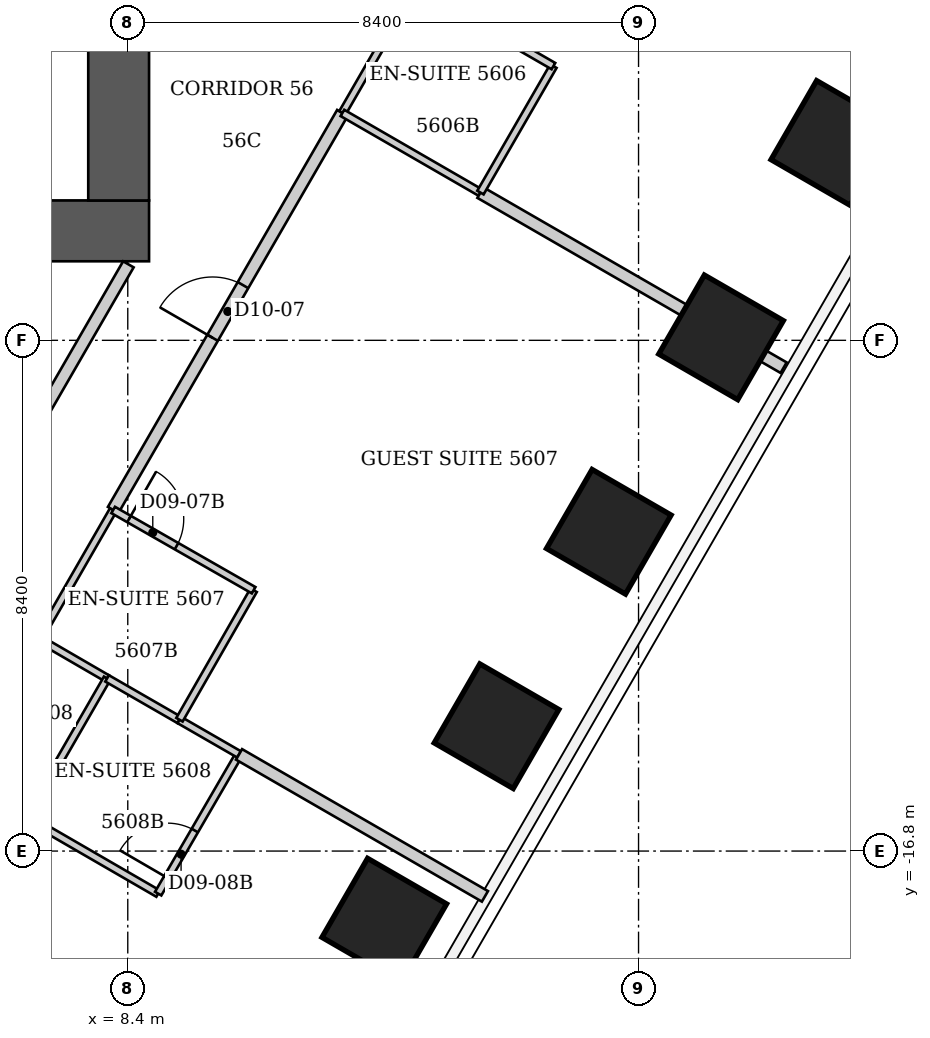
"""IFC4 building model, lengths in metres.
Left out: names, types, materials, properties, quantities, classifications, styles, units other than length and angle.
Written with IfcOpenShell. Run it as: python <this file> out.ifc"""

import sys

from ifc_helpers import new_model, si_unit, direction, frame, frame_2d, origin, origin_2d, place, context, subcontext, project, spatial, rectangle, extrude, element, fill, save


model = new_model("IFC4")
c1 = context("Model", 3, precision=1e-05, world=origin(), true_north=direction((0.0, 1.0)))
c2 = subcontext(c1, "Body", "Model", "MODEL_VIEW")
j1 = project(units=[si_unit("LENGTHUNIT", "METRE"), si_unit("PLANEANGLEUNIT", "RADIAN")], contexts=[c1])
p1 = place(None, origin())
s1 = spatial("IfcSite", under=j1, at=p1, CompositionType="ELEMENT")
p2 = place(p1, origin())
s2 = spatial("IfcBuilding", under=s1, at=p2, CompositionType="ELEMENT")
p3 = place(p2, frame((0.0, 0.0, 225.0)))
s3 = spatial("IfcBuildingStorey", under=s2, at=p3, CompositionType="ELEMENT", Elevation=225.0)
for number, where, z_axis, x_axis in (
    (1, (20.003, -5.153, 0.0), (0.0, 0.0, 1.0), (0.866, -0.5, 0.0)),
    (2, (18.157, -8.351, 0.0), (0.0, 0.0, 1.0), (0.866, -0.5, 0.0)),
    (3, (16.311, -11.549, 0.0), (0.0, 0.0, 1.0), (0.866, -0.5, 0.0)),
    (4, (14.465, -14.747, 0.0), (0.0, 0.0, 1.0), (0.866, -0.5, 0.0)),
    (5, (12.618, -17.945, 0.0), (0.0, 0.0, 1.0), (0.866, -0.5, 0.0)),
):
    element("IfcColumn", number, at=place(p3, frame(where, z_axis=z_axis, x_axis=x_axis)), inside=s3, PredefinedType="COLUMN", context=c2, shape_type="SweptSolid", body=[
        extrude(rectangle(XDim=1.5, YDim=1.5, at=origin_2d()), origin(), (0.0, 0.0, 1.0), 3.8),
    ])
p4 = place(p3, frame((-8.75, -6.6, 0.0), z_axis=(0.0, 0.0, 1.0), x_axis=(1.0, 0.0, 0.0)))
e6 = element("IfcWall", 6, at=p4, inside=s3, PredefinedType="SHEAR", context=c2, shape_type="SweptSolid", body=[
    extrude(rectangle(XDim=17.5, YDim=1.0, at=frame_2d((8.75, 0.0))), origin(), (0.0, 0.0, 1.0), 3.8),
])
p5 = place(p3, frame((8.25, -6.1, 0.0), z_axis=(0.0, 0.0, 1.0), x_axis=(0.0, 1.0, 0.0)))
e7 = element("IfcWall", 7, at=p5, inside=s3, PredefinedType="SHEAR", context=c2, shape_type="SweptSolid", body=[
    extrude(rectangle(XDim=12.2, YDim=1.0, at=frame_2d((6.1, 0.0))), origin(), (0.0, 0.0, 1.0), 3.8),
])
p6 = place(p5, frame((7.6, 0.0, 0.0)))
e8 = element("IfcOpeningElement", 8, at=p6, cuts=e7, PredefinedType="OPENING", context=c2, shape_type="SweptSolid", body=[
    extrude(rectangle(XDim=1.2, YDim=2.2, at=frame_2d((0.6, 1.1))), frame((0.0, 0.5, 0.0), z_axis=(0.0, -1.0, 0.0), x_axis=(1.0, 0.0, 0.0)), (0.0, 0.0, 1.0), 1.0),
])
p7 = place(p3, frame((6.35, -18.33, 0.0), z_axis=(0.0, 0.0, 1.0), x_axis=(0.328164304993, -0.944620658745, 0.0)))
e9 = element("IfcWall", 9, at=p7, inside=s3, PredefinedType="PARTITIONING", context=c2, shape_type="SweptSolid", body=[
    extrude(rectangle(XDim=2.498, YDim=0.12, at=frame_2d((1.249, 0.0))), origin(), (0.0, 0.0, 1.0), 3.64),
])
p8 = place(p3, frame((6.74, -16.25, 0.0), z_axis=(0.0, 0.0, 1.0), x_axis=(0.865508881864, -0.500893576935, 0.0)))
e10 = element("IfcWall", 10, at=p8, inside=s3, PredefinedType="PARTITIONING", context=c2, shape_type="SweptSolid", body=[
    extrude(rectangle(XDim=2.496, YDim=0.12, at=frame_2d((1.248, 0.0))), origin(), (0.0, 0.0, 1.0), 3.64),
])
p9 = place(p3, frame((6.94, -13.31, 0.0), z_axis=(0.0, 0.0, 1.0), x_axis=(0.864952631286, -0.501853510132, 0.0)))
e11 = element("IfcWall", 11, at=p9, inside=s3, PredefinedType="PARTITIONING", context=c2, shape_type="SweptSolid", body=[
    extrude(rectangle(XDim=1.295, YDim=0.12, at=frame_2d((0.647, 0.0))), origin(), (0.0, 0.0, 1.0), 3.64),
])
p10 = place(p3, frame((6.94, -13.31, 0.0), z_axis=(0.0, 0.0, 1.0), x_axis=(0.498748634132, 0.866746675766, 0.0)))
e12 = element("IfcWall", 12, at=p10, inside=s3, PredefinedType="PARTITIONING", context=c2, shape_type="SweptSolid", body=[
    extrude(rectangle(XDim=2.446, YDim=0.12, at=frame_2d((1.223, 0.0))), origin(), (0.0, 0.0, 1.0), 3.64),
])
p11 = place(p3, frame((8.06, -13.96, 0.0), z_axis=(0.0, 0.0, 1.0), x_axis=(-0.499407914056, -0.866366975004, 0.0)))
e13 = element("IfcWall", 13, at=p11, inside=s3, PredefinedType="PARTITIONING", context=c2, shape_type="SweptSolid", body=[
    extrude(rectangle(XDim=2.643, YDim=0.12, at=frame_2d((1.322, 0.0))), origin(), (0.0, 0.0, 1.0), 3.64),
])
p12 = place(p3, frame((8.06, -13.96, 0.0), z_axis=(0.0, 0.0, 1.0), x_axis=(0.866505716338, -0.499167149914, 0.0)))
e14 = element("IfcWall", 14, at=p12, inside=s3, PredefinedType="PARTITIONING", context=c2, shape_type="SweptSolid", body=[
    extrude(rectangle(XDim=1.37, YDim=0.12, at=frame_2d((0.685, 0.0))), origin(), (0.0, 0.0, 1.0), 3.64),
])
p13 = place(p3, frame((8.16, -11.19, 0.0), z_axis=(0.0, 0.0, 1.0), x_axis=(0.500004606796, 0.866022744033, 0.0)))
e15 = element("IfcWall", 15, at=p13, inside=s3, PredefinedType="PARTITIONING", context=c2, shape_type="SweptSolid", body=[
    extrude(rectangle(XDim=7.54, YDim=0.2, at=frame_2d((3.77, 0.0))), origin(), (0.0, 0.0, 1.0), 3.64),
])
p14 = place(p13, frame((3.27, 0.0, 0.0)))
e16 = element("IfcOpeningElement", 16, at=p14, cuts=e15, PredefinedType="OPENING", context=c2, shape_type="SweptSolid", body=[
    extrude(rectangle(XDim=1.0, YDim=2.13, at=frame_2d((0.5, 1.065))), frame((0.0, 0.1, 0.0), z_axis=(0.0, -1.0, 0.0), x_axis=(1.0, 0.0, 0.0)), (0.0, 0.0, 1.0), 0.2),
])
p15 = place(p3, frame((8.41, -7.15, 0.0), z_axis=(0.0, 0.0, 1.0), x_axis=(-0.499828628176, -0.866124322748, 0.0)))
e17 = element("IfcWall", 17, at=p15, inside=s3, PredefinedType="PARTITIONING", context=c2, shape_type="SweptSolid", body=[
    extrude(rectangle(XDim=10.484, YDim=0.2, at=frame_2d((5.242, 0.0))), origin(), (0.0, 0.0, 1.0), 3.64),
])
p16 = place(p15, frame((4.692, 0.0, 0.0)))
e18 = element("IfcOpeningElement", 18, at=p16, cuts=e17, PredefinedType="OPENING", context=c2, shape_type="SweptSolid", body=[
    extrude(rectangle(XDim=1.1, YDim=2.2, at=frame_2d((0.55, 1.1))), frame((0.0, 0.1, 0.0), z_axis=(0.0, -1.0, 0.0), x_axis=(1.0, 0.0, 0.0)), (0.0, 0.0, 1.0), 0.2),
])
p17 = place(p3, frame((8.9, -17.5, 0.0), z_axis=(0.0, 0.0, 1.0), x_axis=(0.502242265546, 0.864726954997, 0.0)))
e19 = element("IfcWall", 19, at=p17, inside=s3, PredefinedType="PARTITIONING", context=c2, shape_type="SweptSolid", body=[
    extrude(rectangle(XDim=2.648, YDim=0.12, at=frame_2d((1.324, 0.0))), origin(), (0.0, 0.0, 1.0), 3.64),
])
p18 = place(p17, frame((0.3, 0.0, 0.0)))
e20 = element("IfcOpeningElement", 20, at=p18, cuts=e19, PredefinedType="OPENING", context=c2, shape_type="SweptSolid", body=[
    extrude(rectangle(XDim=0.9, YDim=2.03, at=frame_2d((0.45, 1.015))), frame((0.0, 0.06, 0.0), z_axis=(0.0, -1.0, 0.0), x_axis=(1.0, 0.0, 0.0)), (0.0, 0.0, 1.0), 0.12),
])
p19 = place(p3, frame((9.248, -14.644, 0.0), z_axis=(0.0, 0.0, 1.0), x_axis=(0.866515213998, -0.499150662536, 0.0)))
e21 = element("IfcWall", 21, at=p19, inside=s3, PredefinedType="PARTITIONING", context=c2, shape_type="SweptSolid", body=[
    extrude(rectangle(XDim=1.134, YDim=0.12, at=frame_2d((0.567, 0.0))), origin(), (0.0, 0.0, 1.0), 3.64),
])
p20 = place(p3, frame((9.25, -14.64, 0.0), z_axis=(0.0, 0.0, 1.0), x_axis=(0.497027744361, 0.86773464915, 0.0)))
e22 = element("IfcWall", 22, at=p20, inside=s3, PredefinedType="PARTITIONING", context=c2, shape_type="SweptSolid", body=[
    extrude(rectangle(XDim=2.455, YDim=0.12, at=frame_2d((1.227, 0.0))), origin(), (0.0, 0.0, 1.0), 3.64),
])
p21 = place(p3, frame((10.23, -15.21, 0.0), z_axis=(0.0, 0.0, 1.0), x_axis=(0.86600796803, -0.500030198396, 0.0)))
e23 = element("IfcWall", 23, at=p21, inside=s3, PredefinedType="PARTITIONING", context=c2, shape_type="SweptSolid", body=[
    extrude(rectangle(XDim=4.67, YDim=0.2, at=frame_2d((2.335, 0.0))), origin(), (0.0, 0.0, 1.0), 3.64),
])
p22 = place(p3, frame((10.47, -12.51, 0.0), z_axis=(0.0, 0.0, 1.0), x_axis=(-0.86821490448, 0.49618835097, 0.0)))
e24 = element("IfcWall", 24, at=p22, inside=s3, PredefinedType="PARTITIONING", context=c2, shape_type="SweptSolid", body=[
    extrude(rectangle(XDim=2.66, YDim=0.12, at=frame_2d((1.33, 0.0))), origin(), (0.0, 0.0, 1.0), 2.878),
])
p23 = place(p22, frame((1.46, 0.0, 0.0)))
e25 = element("IfcOpeningElement", 25, at=p23, cuts=e24, PredefinedType="OPENING", context=c2, shape_type="SweptSolid", body=[
    extrude(rectangle(XDim=0.9, YDim=2.03, at=frame_2d((0.45, 1.015))), frame((0.0, 0.06, 0.0), z_axis=(0.0, -1.0, 0.0), x_axis=(1.0, 0.0, 0.0)), (0.0, 0.0, 1.0), 0.12),
])
p24 = place(p3, frame((11.93, -4.66, 0.0), z_axis=(0.0, 0.0, 1.0), x_axis=(0.499737123639, 0.866177122335, 0.0)))
e26 = element("IfcWall", 26, at=p24, inside=s3, PredefinedType="PARTITIONING", context=c2, shape_type="SweptSolid", body=[
    extrude(rectangle(XDim=2.401, YDim=0.12, at=frame_2d((1.201, 0.0))), origin(), (0.0, 0.0, 1.0), 3.64),
])
p25 = place(p3, frame((11.93, -4.66, 0.0), z_axis=(0.0, 0.0, 1.0), x_axis=(0.865969958829, -0.500096021185, 0.0)))
e27 = element("IfcWall", 27, at=p25, inside=s3, PredefinedType="PARTITIONING", context=c2, shape_type="SweptSolid", body=[
    extrude(rectangle(XDim=2.621, YDim=0.12, at=frame_2d((1.311, 0.0))), origin(), (0.0, 0.0, 1.0), 3.038),
])
p26 = place(p3, frame((14.2, -5.971, 0.0), z_axis=(0.0, 0.0, 1.0), x_axis=(0.86600340545, -0.500038100297, 0.0)))
e28 = element("IfcWall", 28, at=p26, inside=s3, PredefinedType="PARTITIONING", context=c2, shape_type="SweptSolid", body=[
    extrude(rectangle(XDim=5.758, YDim=0.2, at=frame_2d((2.879, 0.0))), origin(), (0.0, 0.0, 1.0), 3.038),
])
p27 = place(p3, frame((14.2, -5.97, 0.0), z_axis=(0.0, 0.0, 1.0), x_axis=(0.499737123639, 0.866177122335, 0.0)))
e29 = element("IfcWall", 29, at=p27, inside=s3, PredefinedType="PARTITIONING", context=c2, shape_type="SweptSolid", body=[
    extrude(rectangle(XDim=2.401, YDim=0.12, at=frame_2d((1.201, 0.0))), origin(), (0.0, 0.0, 1.0), 3.64),
])
p28 = place(p3, frame((15.4, -3.89, 0.0), z_axis=(0.0, 0.0, 1.0), x_axis=(-0.866154567199, 0.49977621564, 0.0)))
e30 = element("IfcWall", 30, at=p28, inside=s3, PredefinedType="PARTITIONING", context=c2, shape_type="SweptSolid", body=[
    extrude(rectangle(XDim=2.621, YDim=0.12, at=frame_2d((1.311, 0.0))), origin(), (0.0, 0.0, 1.0), 3.64),
])
p29 = place(p28, frame((1.421, 0.0, 0.0)))
e31 = element("IfcOpeningElement", 31, at=p29, cuts=e30, PredefinedType="OPENING", context=c2, shape_type="SweptSolid", body=[
    extrude(rectangle(XDim=0.9, YDim=2.03, at=frame_2d((0.45, 1.015))), frame((0.0, 0.06, 0.0), z_axis=(0.0, -1.0, 0.0), x_axis=(1.0, 0.0, 0.0)), (0.0, 0.0, 1.0), 0.12),
])
p30 = place(p14, origin())
e32 = element("IfcDoor", 32, at=p30, inside=s3, OperationType="SINGLE_SWING_LEFT", PredefinedType="DOOR", context=c2, shape_type="SweptSolid", body=[
    extrude(rectangle(XDim=1.0, YDim=2.13, at=frame_2d((0.5, 1.065))), frame((0.0, 0.025, 0.0), z_axis=(0.0, -1.0, 0.0), x_axis=(1.0, 0.0, 0.0)), (0.0, 0.0, 1.0), 0.05),
])
fill(e16, e32)
p31 = place(p23, origin())
e33 = element("IfcDoor", 33, at=p31, inside=s3, OperationType="SINGLE_SWING_RIGHT", PredefinedType="DOOR", context=c2, shape_type="SweptSolid", body=[
    extrude(rectangle(XDim=0.9, YDim=2.03, at=frame_2d((0.45, 1.015))), frame((0.0, 0.025, 0.0), z_axis=(0.0, -1.0, 0.0), x_axis=(1.0, 0.0, 0.0)), (0.0, 0.0, 1.0), 0.05),
])
fill(e25, e33)
p32 = place(p18, origin())
e34 = element("IfcDoor", 34, at=p32, inside=s3, OperationType="SINGLE_SWING_LEFT", PredefinedType="DOOR", context=c2, shape_type="SweptSolid", body=[
    extrude(rectangle(XDim=0.9, YDim=2.03, at=frame_2d((0.45, 1.015))), frame((0.0, 0.025, 0.0), z_axis=(0.0, -1.0, 0.0), x_axis=(1.0, 0.0, 0.0)), (0.0, 0.0, 1.0), 0.05),
])
fill(e20, e34)
save(model, sys.argv[1])
